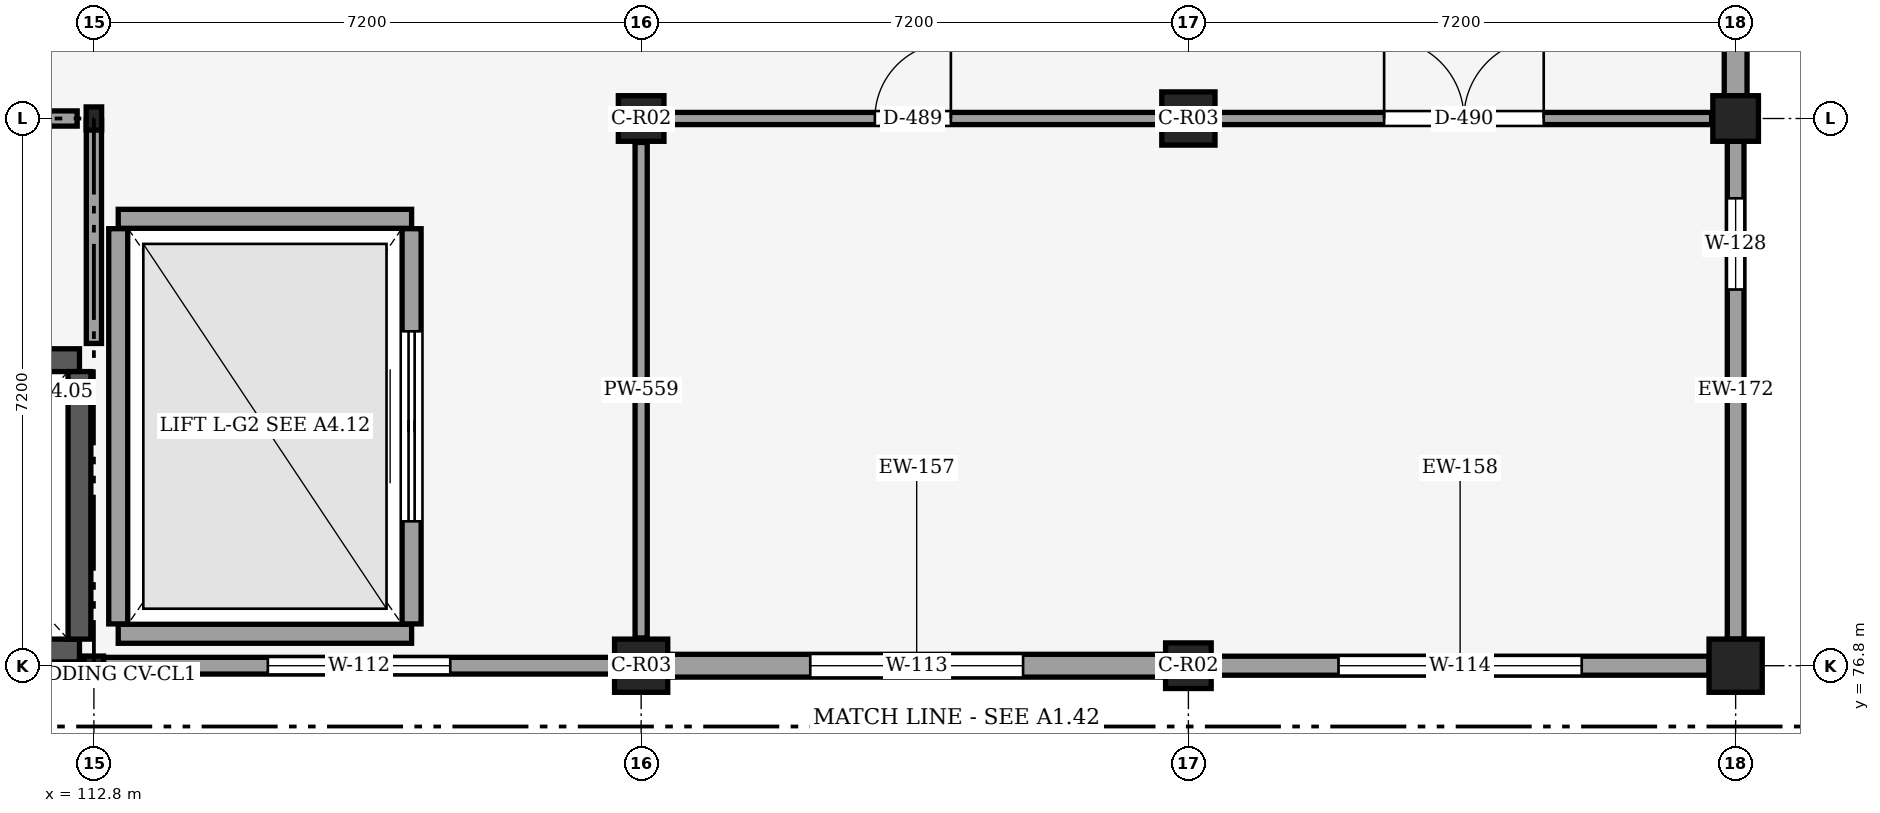
"""IFC4 building model, lengths in metres.
Left out: names, types, materials, properties, quantities, classifications, styles, units other than length and angle.
Written with IfcOpenShell. Run it as: python <this file> out.ifc"""

import sys

from ifc_helpers import new_model, si_unit, direction, frame, frame_2d, origin, origin_2d, place, context, subcontext, project, spatial, rectangle, hollow_rectangle, extrude, element, fill, save


model = new_model("IFC4")
c1 = context("Model", 3, precision=1e-05, world=origin(), true_north=direction((0.0, 1.0)))
c2 = subcontext(c1, "Body", "Model", "MODEL_VIEW")
j1 = project(units=[si_unit("LENGTHUNIT", "METRE"), si_unit("PLANEANGLEUNIT", "RADIAN")], contexts=[c1])
p1 = place(None, origin())
s1 = spatial("IfcSite", under=j1, at=p1, CompositionType="ELEMENT")
p2 = place(p1, origin())
s2 = spatial("IfcBuilding", under=s1, at=p2, CompositionType="ELEMENT")
p3 = place(p2, frame((0.0, 0.0, 15.0)))
s3 = spatial("IfcBuildingStorey", under=s2, at=p3, CompositionType="ELEMENT", Elevation=15.0)
p4 = place(p3, frame((112.8, 76.8, 0.0), z_axis=(0.0, 0.0, 1.0), x_axis=(1.0, 0.0, 0.0)))
e1 = element("IfcColumn", 1, at=p4, inside=s3, PredefinedType="COLUMN", context=c2, shape_type="SweptSolid", body=[
    extrude(hollow_rectangle(XDim=0.254, YDim=0.254, WallThickness=0.013, OuterFilletRadius=0.025, at=origin_2d()), origin(), (0.0, 0.0, 1.0), 4.8),
])
p5 = place(p3, frame((112.8, 84.0, 0.0), z_axis=(0.0, 0.0, 1.0), x_axis=(1.0, 0.0, 0.0)))
e2 = element("IfcColumn", 2, at=p5, inside=s3, PredefinedType="COLUMN", context=c2, shape_type="SweptSolid", body=[
    extrude(hollow_rectangle(XDim=0.203, YDim=0.305, WallThickness=0.013, OuterFilletRadius=0.025, at=origin_2d()), origin(), (0.0, 0.0, 1.0), 4.8),
])
p6 = place(p3, frame((120.0, 76.8, 0.0), z_axis=(0.0, 0.0, 1.0), x_axis=(1.0, 0.0, 0.0)))
e3 = element("IfcColumn", 3, at=p6, inside=s3, PredefinedType="COLUMN", context=c2, shape_type="SweptSolid", body=[
    extrude(rectangle(XDim=0.7, YDim=0.7, at=origin_2d()), origin(), (0.0, 0.0, 1.0), 4.8),
])
for number, where, z_axis, x_axis in (
    (4, (120.0, 84.0, 0.0), (0.0, 0.0, 1.0), (1.0, 0.0, 0.0)),
    (5, (127.2, 76.8, 0.0), (0.0, 0.0, 1.0), (1.0, 0.0, 0.0)),
):
    element("IfcColumn", number, at=place(p3, frame(where, z_axis=z_axis, x_axis=x_axis)), inside=s3, PredefinedType="COLUMN", context=c2, shape_type="SweptSolid", body=[
        extrude(rectangle(XDim=0.6, YDim=0.6, at=origin_2d()), origin(), (0.0, 0.0, 1.0), 4.8),
    ])
for number, where, z_axis, x_axis in (
    (6, (127.2, 84.0, 0.0), (0.0, 0.0, 1.0), (1.0, 0.0, 0.0)),
    (7, (134.4, 76.8, 0.0), (0.0, 0.0, 1.0), (1.0, 0.0, 0.0)),
):
    element("IfcColumn", number, at=place(p3, frame(where, z_axis=z_axis, x_axis=x_axis)), inside=s3, PredefinedType="COLUMN", context=c2, shape_type="SweptSolid", body=[
        extrude(rectangle(XDim=0.7, YDim=0.7, at=origin_2d()), origin(), (0.0, 0.0, 1.0), 4.8),
    ])
p7 = place(p3, frame((134.4, 84.0, 0.0), z_axis=(0.0, 0.0, 1.0), x_axis=(1.0, 0.0, 0.0)))
e8 = element("IfcColumn", 8, at=p7, inside=s3, PredefinedType="COLUMN", context=c2, shape_type="SweptSolid", body=[
    extrude(rectangle(XDim=0.6, YDim=0.6, at=origin_2d()), origin(), (0.0, 0.0, 1.0), 4.8),
])
p8 = place(p3, frame((119.65, 76.8, 0.0), z_axis=(0.0, 0.0, 1.0), x_axis=(-1.0, 0.0, 0.0)))
e9 = element("IfcWall", 9, at=p8, inside=s3, PredefinedType="SOLIDWALL", context=c2, shape_type="SweptSolid", body=[
    extrude(rectangle(XDim=6.723, YDim=0.22, at=frame_2d((3.361, 0.0))), origin(), (0.0, 0.0, 1.0), 3.695),
])
p9 = place(p8, frame((2.162, 0.0, 0.9)))
e10 = element("IfcOpeningElement", 10, at=p9, cuts=e9, PredefinedType="OPENING", context=c2, shape_type="SweptSolid", body=[
    extrude(rectangle(XDim=2.4, YDim=0.9, at=frame_2d((1.2, 0.45))), frame((0.0, 0.12, 0.0), z_axis=(0.0, -1.0, 0.0), x_axis=(1.0, 0.0, 0.0)), (0.0, 0.0, 1.0), 0.24),
])
p10 = place(p3, frame((126.9, 76.8, 0.0), z_axis=(0.0, 0.0, 1.0), x_axis=(-1.0, 0.0, 0.0)))
e11 = element("IfcWall", 11, at=p10, inside=s3, PredefinedType="SOLIDWALL", context=c2, shape_type="SweptSolid", body=[
    extrude(rectangle(XDim=6.55, YDim=0.3, at=frame_2d((3.275, 0.0))), origin(), (0.0, 0.0, 1.0), 3.695),
])
p11 = place(p10, frame((1.875, 0.0, 0.9)))
e12 = element("IfcOpeningElement", 12, at=p11, cuts=e11, PredefinedType="OPENING", context=c2, shape_type="SweptSolid", body=[
    extrude(rectangle(XDim=2.8, YDim=0.9, at=frame_2d((1.4, 0.45))), frame((0.0, 0.16, 0.0), z_axis=(0.0, -1.0, 0.0), x_axis=(1.0, 0.0, 0.0)), (0.0, 0.0, 1.0), 0.321),
])
p12 = place(p3, frame((134.05, 76.8, 0.0), z_axis=(0.0, 0.0, 1.0), x_axis=(-1.0, 0.0, 0.0)))
e13 = element("IfcWall", 13, at=p12, inside=s3, PredefinedType="SOLIDWALL", context=c2, shape_type="SweptSolid", body=[
    extrude(rectangle(XDim=6.55, YDim=0.25, at=frame_2d((3.275, 0.0))), origin(), (0.0, 0.0, 1.0), 3.695),
])
p13 = place(p12, frame((1.675, 0.0, 0.9)))
e14 = element("IfcOpeningElement", 14, at=p13, cuts=e13, PredefinedType="OPENING", context=c2, shape_type="SweptSolid", body=[
    extrude(rectangle(XDim=3.2, YDim=1.05, at=frame_2d((1.6, 0.525))), frame((0.0, 0.135, 0.0), z_axis=(0.0, -1.0, 0.0), x_axis=(1.0, 0.0, 0.0)), (0.0, 0.0, 1.0), 0.271),
])
p14 = place(p3, frame((134.4, 83.7, 0.0), z_axis=(0.0, 0.0, 1.0), x_axis=(0.0, -1.0, 0.0)))
e15 = element("IfcWall", 15, at=p14, inside=s3, PredefinedType="SOLIDWALL", context=c2, shape_type="SweptSolid", body=[
    extrude(rectangle(XDim=6.55, YDim=0.22, at=frame_2d((3.275, 0.0))), origin(), (0.0, 0.0, 1.0), 4.54),
])
p15 = place(p14, frame((0.75, 0.0, 0.9)))
e16 = element("IfcOpeningElement", 16, at=p15, cuts=e15, PredefinedType="OPENING", context=c2, shape_type="SweptSolid", body=[
    extrude(rectangle(XDim=1.2, YDim=1.5, at=frame_2d((0.6, 0.75))), frame((0.0, 0.12, 0.0), z_axis=(0.0, -1.0, 0.0), x_axis=(1.0, 0.0, 0.0)), (0.0, 0.0, 1.0), 0.24),
])
p16 = place(p3, frame((134.4, 90.85, 0.0), z_axis=(0.0, 0.0, 1.0), x_axis=(0.0, -1.0, 0.0)))
e17 = element("IfcWall", 17, at=p16, inside=s3, PredefinedType="SOLIDWALL", context=c2, shape_type="SweptSolid", body=[
    extrude(rectangle(XDim=6.55, YDim=0.3, at=frame_2d((3.275, 0.0))), origin(), (0.0, 0.0, 1.0), 4.54),
])
p17 = place(p16, frame((0.75, 0.0, 0.9)))
e18 = element("IfcOpeningElement", 18, at=p17, cuts=e17, PredefinedType="OPENING", context=c2, shape_type="SweptSolid", body=[
    extrude(rectangle(XDim=1.2, YDim=1.5, at=frame_2d((0.6, 0.75))), frame((0.0, 0.16, 0.0), z_axis=(0.0, -1.0, 0.0), x_axis=(1.0, 0.0, 0.0)), (0.0, 0.0, 1.0), 0.321),
])
p18 = place(p3, frame((104.59, 77.0, 0.0), z_axis=(0.0, 0.0, 1.0), x_axis=(1.0, 0.0, 0.0)))
e19 = element("IfcWall", 19, at=p18, inside=s3, PredefinedType="SHEAR", context=c2, shape_type="SweptSolid", body=[
    extrude(rectangle(XDim=8.02, YDim=0.3, at=frame_2d((4.01, 0.0))), origin(), (0.0, 0.0, 1.0), 4.54),
])
p19 = place(p3, frame((104.59, 80.82, 0.0), z_axis=(0.0, 0.0, 1.0), x_axis=(1.0, 0.0, 0.0)))
e20 = element("IfcWall", 20, at=p19, inside=s3, PredefinedType="SHEAR", context=c2, shape_type="SweptSolid", body=[
    extrude(rectangle(XDim=8.02, YDim=0.3, at=frame_2d((4.01, 0.0))), origin(), (0.0, 0.0, 1.0), 4.54),
])
p20 = place(p19, frame((0.45, 0.0, 0.0)))
e21 = element("IfcOpeningElement", 21, at=p20, cuts=e20, PredefinedType="OPENING", context=c2, shape_type="SweptSolid", body=[
    extrude(rectangle(XDim=1.1, YDim=2.15, at=frame_2d((0.55, 1.075))), frame((0.0, 0.16, 0.0), z_axis=(0.0, -1.0, 0.0), x_axis=(1.0, 0.0, 0.0)), (0.0, 0.0, 1.0), 0.321),
])
p21 = place(p3, frame((112.61, 77.15, 0.0), z_axis=(0.0, 0.0, 1.0), x_axis=(0.0, 1.0, 0.0)))
e22 = element("IfcWall", 22, at=p21, inside=s3, PredefinedType="SHEAR", context=c2, shape_type="SweptSolid", body=[
    extrude(rectangle(XDim=3.52, YDim=0.3, at=frame_2d((1.76, 0.0))), origin(), (0.0, 0.0, 1.0), 4.54),
])
p22 = place(p3, frame((112.8, 81.04, 0.0), z_axis=(0.0, 0.0, 1.0), x_axis=(0.0, 1.0, 0.0)))
e23 = element("IfcWall", 23, at=p22, inside=s3, PredefinedType="PARTITIONING", context=c2, shape_type="SweptSolid", body=[
    extrude(rectangle(XDim=2.94, YDim=0.2, at=frame_2d((1.47, 0.0))), origin(), (0.0, 0.0, 1.0), 4.54),
])
p23 = place(p3, frame((104.62, 84.0, 0.0), z_axis=(0.0, 0.0, 1.0), x_axis=(1.0, 0.0, 0.0)))
e24 = element("IfcWall", 24, at=p23, inside=s3, PredefinedType="PARTITIONING", context=c2, shape_type="SweptSolid", body=[
    extrude(rectangle(XDim=7.96, YDim=0.2, at=frame_2d((3.98, 0.0))), origin(), (0.0, 0.0, 1.0), 4.54),
])
p24 = place(p23, frame((3.255, 0.0, 0.0)))
e25 = element("IfcOpeningElement", 25, at=p24, cuts=e24, PredefinedType="OPENING", context=c2, shape_type="SweptSolid", body=[
    extrude(rectangle(XDim=1.45, YDim=2.2, at=frame_2d((0.725, 1.1))), frame((0.0, 0.11, 0.0), z_axis=(0.0, -1.0, 0.0), x_axis=(1.0, 0.0, 0.0)), (0.0, 0.0, 1.0), 0.22),
])
for number, where, z_axis, x_axis in (
    (26, (113.12, 82.68, 0.0), (0.0, 0.0, 1.0), (1.0, 0.0, 0.0)),
    (27, (113.12, 77.22, 0.0), (0.0, 0.0, 1.0), (1.0, 0.0, 0.0)),
):
    element("IfcWall", number, at=place(p3, frame(where, z_axis=z_axis, x_axis=x_axis)), inside=s3, PredefinedType="PARTITIONING", context=c2, shape_type="SweptSolid", body=[
        extrude(rectangle(XDim=3.86, YDim=0.25, at=frame_2d((1.93, 0.0))), origin(), (0.0, 0.0, 1.0), 4.54),
    ])
p25 = place(p3, frame((113.12, 77.35, 0.0), z_axis=(0.0, 0.0, 1.0), x_axis=(0.0, 1.0, 0.0)))
e28 = element("IfcWall", 28, at=p25, inside=s3, PredefinedType="PARTITIONING", context=c2, shape_type="SweptSolid", body=[
    extrude(rectangle(XDim=5.2, YDim=0.25, at=frame_2d((2.6, 0.0))), origin(), (0.0, 0.0, 1.0), 4.54),
])
p26 = place(p3, frame((116.98, 77.35, 0.0), z_axis=(0.0, 0.0, 1.0), x_axis=(0.0, 1.0, 0.0)))
e29 = element("IfcWall", 29, at=p26, inside=s3, PredefinedType="PARTITIONING", context=c2, shape_type="SweptSolid", body=[
    extrude(rectangle(XDim=5.2, YDim=0.25, at=frame_2d((2.6, 0.0))), origin(), (0.0, 0.0, 1.0), 4.54),
])
p27 = place(p26, frame((1.35, 0.0, 0.0)))
e30 = element("IfcOpeningElement", 30, at=p27, cuts=e29, PredefinedType="OPENING", context=c2, shape_type="SweptSolid", body=[
    extrude(rectangle(XDim=2.5, YDim=2.6, at=frame_2d((1.25, 1.3))), frame((0.0, 0.135, 0.0), z_axis=(0.0, -1.0, 0.0), x_axis=(1.0, 0.0, 0.0)), (0.0, 0.0, 1.0), 0.271),
])
p28 = place(p3, frame((120.0, 77.165, 0.0), z_axis=(0.0, 0.0, 1.0), x_axis=(0.0, 1.0, 0.0)))
e31 = element("IfcWall", 31, at=p28, inside=s3, PredefinedType="PARTITIONING", context=c2, shape_type="SweptSolid", body=[
    extrude(rectangle(XDim=6.52, YDim=0.16, at=frame_2d((3.26, 0.0))), origin(), (0.0, 0.0, 1.0), 4.52),
])
p29 = place(p3, frame((120.315, 84.0, 0.0), z_axis=(0.0, 0.0, 1.0), x_axis=(1.0, 0.0, 0.0)))
e32 = element("IfcWall", 32, at=p29, inside=s3, PredefinedType="PARTITIONING", context=c2, shape_type="SweptSolid", body=[
    extrude(rectangle(XDim=6.52, YDim=0.16, at=frame_2d((3.26, 0.0))), origin(), (0.0, 0.0, 1.0), 4.52),
])
p30 = place(p29, frame((2.76, 0.0, 0.0)))
e33 = element("IfcOpeningElement", 33, at=p30, cuts=e32, PredefinedType="OPENING", context=c2, shape_type="SweptSolid", body=[
    extrude(rectangle(XDim=1.0, YDim=2.15, at=frame_2d((0.5, 1.075))), frame((0.0, 0.09, 0.0), z_axis=(0.0, -1.0, 0.0), x_axis=(1.0, 0.0, 0.0)), (0.0, 0.0, 1.0), 0.18),
])
p31 = place(p3, frame((127.565, 84.0, 0.0), z_axis=(0.0, 0.0, 1.0), x_axis=(1.0, 0.0, 0.0)))
e34 = element("IfcWall", 34, at=p31, inside=s3, PredefinedType="PARTITIONING", context=c2, shape_type="SweptSolid", body=[
    extrude(rectangle(XDim=6.52, YDim=0.16, at=frame_2d((3.26, 0.0))), origin(), (0.0, 0.0, 1.0), 4.52),
])
p32 = place(p31, frame((2.21, 0.0, 0.0)))
e35 = element("IfcOpeningElement", 35, at=p32, cuts=e34, PredefinedType="OPENING", context=c2, shape_type="SweptSolid", body=[
    extrude(rectangle(XDim=2.1, YDim=2.5, at=frame_2d((1.05, 1.25))), frame((0.0, 0.09, 0.0), z_axis=(0.0, -1.0, 0.0), x_axis=(1.0, 0.0, 0.0)), (0.0, 0.0, 1.0), 0.18),
])
p33 = place(p9, origin())
e36 = element("IfcWindow", 36, at=p33, inside=s3, PartitioningType="SINGLE_PANEL", PredefinedType="WINDOW", context=c2, shape_type="SweptSolid", body=[
    extrude(rectangle(XDim=2.4, YDim=0.9, at=frame_2d((1.2, 0.45))), frame((0.0, 0.03, 0.0), z_axis=(0.0, -1.0, 0.0), x_axis=(1.0, 0.0, 0.0)), (0.0, 0.0, 1.0), 0.06),
])
fill(e10, e36)
p34 = place(p11, origin())
e37 = element("IfcWindow", 37, at=p34, inside=s3, PartitioningType="SINGLE_PANEL", PredefinedType="WINDOW", context=c2, shape_type="SweptSolid", body=[
    extrude(rectangle(XDim=2.8, YDim=0.9, at=frame_2d((1.4, 0.45))), frame((0.0, 0.03, 0.0), z_axis=(0.0, -1.0, 0.0), x_axis=(1.0, 0.0, 0.0)), (0.0, 0.0, 1.0), 0.06),
])
fill(e12, e37)
p35 = place(p13, origin())
e38 = element("IfcWindow", 38, at=p35, inside=s3, PartitioningType="SINGLE_PANEL", PredefinedType="WINDOW", context=c2, shape_type="SweptSolid", body=[
    extrude(rectangle(XDim=3.2, YDim=1.05, at=frame_2d((1.6, 0.525))), frame((0.0, 0.03, 0.0), z_axis=(0.0, -1.0, 0.0), x_axis=(1.0, 0.0, 0.0)), (0.0, 0.0, 1.0), 0.06),
])
fill(e14, e38)
p36 = place(p15, origin())
e39 = element("IfcWindow", 39, at=p36, inside=s3, PartitioningType="SINGLE_PANEL", PredefinedType="WINDOW", context=c2, shape_type="SweptSolid", body=[
    extrude(rectangle(XDim=1.2, YDim=1.5, at=frame_2d((0.6, 0.75))), frame((0.0, 0.03, 0.0), z_axis=(0.0, -1.0, 0.0), x_axis=(1.0, 0.0, 0.0)), (0.0, 0.0, 1.0), 0.06),
])
fill(e16, e39)
p37 = place(p27, origin())
e40 = element("IfcDoor", 40, at=p37, inside=s3, OperationType="DOUBLE_DOOR_SLIDING", PredefinedType="DOOR", context=c2, shape_type="SweptSolid", body=[
    extrude(rectangle(XDim=2.5, YDim=2.6, at=frame_2d((1.25, 1.3))), frame((0.0, 0.025, 0.0), z_axis=(0.0, -1.0, 0.0), x_axis=(1.0, 0.0, 0.0)), (0.0, 0.0, 1.0), 0.05),
])
fill(e30, e40)
p38 = place(p30, origin())
e41 = element("IfcDoor", 41, at=p38, inside=s3, OperationType="SINGLE_SWING_RIGHT", PredefinedType="DOOR", context=c2, shape_type="SweptSolid", body=[
    extrude(rectangle(XDim=1.0, YDim=2.15, at=frame_2d((0.5, 1.075))), frame((0.0, 0.025, 0.0), z_axis=(0.0, -1.0, 0.0), x_axis=(1.0, 0.0, 0.0)), (0.0, 0.0, 1.0), 0.05),
])
fill(e33, e41)
p39 = place(p32, origin())
e42 = element("IfcDoor", 42, at=p39, inside=s3, OperationType="DOUBLE_DOOR_SINGLE_SWING", PredefinedType="DOOR", context=c2, shape_type="SweptSolid", body=[
    extrude(rectangle(XDim=2.1, YDim=2.5, at=frame_2d((1.05, 1.25))), frame((0.0, 0.025, 0.0), z_axis=(0.0, -1.0, 0.0), x_axis=(1.0, 0.0, 0.0)), (0.0, 0.0, 1.0), 0.05),
])
fill(e35, e42)
save(model, sys.argv[1])
